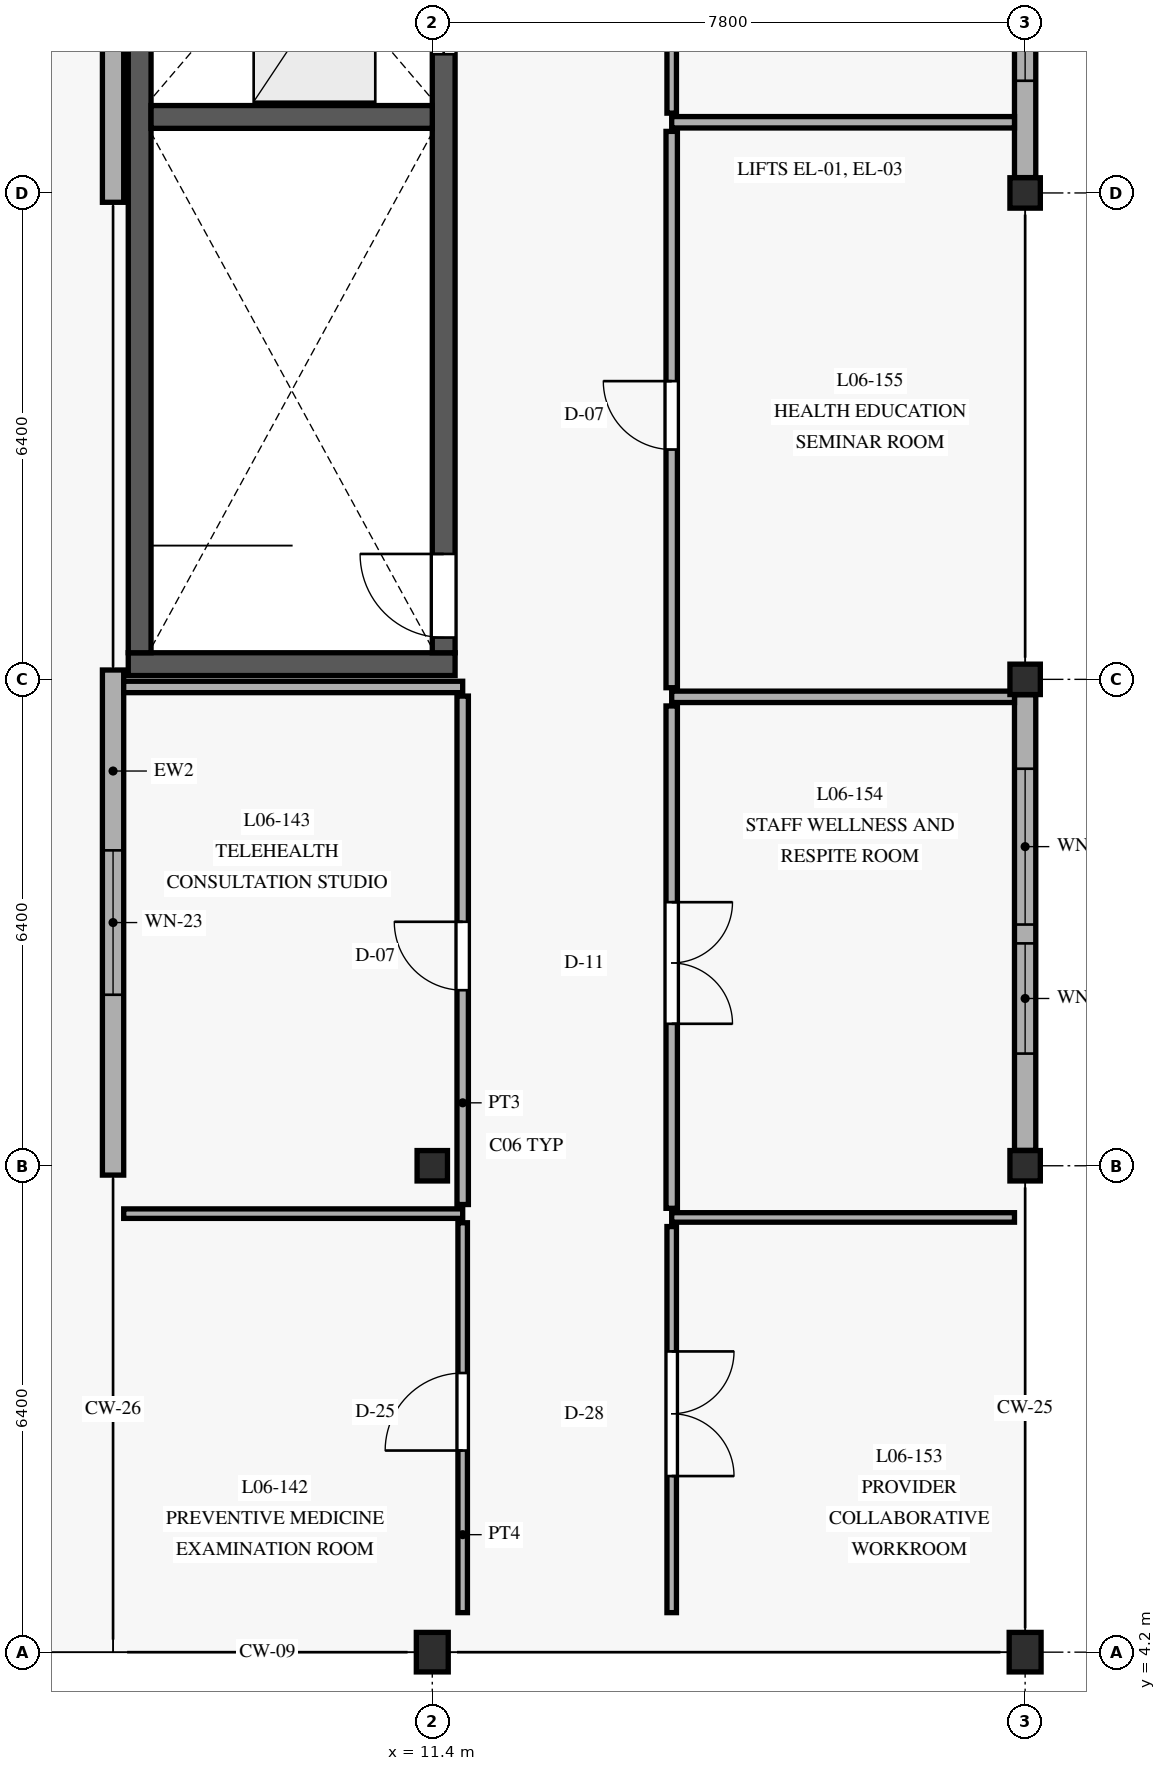
"""IFC4 building model, lengths in metres.
Left out: names, types, materials, properties, quantities, classifications, styles, units other than length and angle.
Written with IfcOpenShell. Run it as: python <this file> out.ifc"""

import sys

from ifc_helpers import new_model, si_unit, direction, frame, frame_2d, origin, origin_with_axes, origin_2d, place, context, subcontext, project, spatial, rectangle, extrude, element, fill, save


model = new_model("IFC4")
c1 = context("Model", 3, precision=1e-05, world=origin(), true_north=direction((0.0, 1.0)))
c2 = subcontext(c1, "Body", "Model", "MODEL_VIEW")
j1 = project(units=[si_unit("LENGTHUNIT", "METRE"), si_unit("PLANEANGLEUNIT", "RADIAN")], contexts=[c1])
p1 = place(None, origin())
s1 = spatial("IfcSite", under=j1, at=p1, CompositionType="ELEMENT")
p2 = place(p1, origin())
s2 = spatial("IfcBuilding", under=s1, at=p2, CompositionType="ELEMENT")
p3 = place(p2, frame((0.0, 0.0, 21.6)))
s3 = spatial("IfcBuildingStorey", under=s2, at=p3, CompositionType="ELEMENT", Elevation=21.6)
p4 = place(p3, frame((11.4, 4.2, 0.0), z_axis=(0.0, 0.0, 1.0), x_axis=(1.0, 0.0, 0.0)))
e1 = element("IfcColumn", 1, at=p4, inside=s3, PredefinedType="COLUMN", context=c2, shape_type="SweptSolid", body=[
    extrude(rectangle(XDim=0.42, YDim=0.52, at=origin_2d()), origin(), (0.0, 0.0, 1.0), 4.05),
])
p5 = place(p3, frame((11.4, 10.6, 0.0), z_axis=(0.0, 0.0, 1.0), x_axis=(1.0, 0.0, 0.0)))
e2 = element("IfcColumn", 2, at=p5, inside=s3, PredefinedType="COLUMN", context=c2, shape_type="SweptSolid", body=[
    extrude(rectangle(XDim=0.4, YDim=0.4, at=origin_2d()), origin(), (0.0, 0.0, 1.0), 4.05),
])
p6 = place(p3, frame((19.2, 4.2, 0.0), z_axis=(0.0, 0.0, 1.0), x_axis=(1.0, 0.0, 0.0)))
e3 = element("IfcColumn", 3, at=p6, inside=s3, PredefinedType="COLUMN", context=c2, shape_type="SweptSolid", body=[
    extrude(rectangle(XDim=0.42, YDim=0.52, at=origin_2d()), origin(), (0.0, 0.0, 1.0), 4.05),
])
for number, where, z_axis, x_axis in (
    (4, (19.2, 10.6, 0.0), (0.0, 0.0, 1.0), (1.0, 0.0, 0.0)),
    (5, (19.2, 17.0, 0.0), (0.0, 0.0, 1.0), (1.0, 0.0, 0.0)),
    (6, (19.2, 23.4, 0.0), (0.0, 0.0, 1.0), (1.0, 0.0, 0.0)),
):
    element("IfcColumn", number, at=place(p3, frame(where, z_axis=z_axis, x_axis=x_axis)), inside=s3, PredefinedType="COLUMN", context=c2, shape_type="SweptSolid", body=[
        extrude(rectangle(XDim=0.4, YDim=0.4, at=origin_2d()), origin(), (0.0, 0.0, 1.0), 4.05),
    ])
p7 = place(p3, frame((7.4, 17.2, 0.0), z_axis=(0.0, 0.0, 1.0), x_axis=(1.0, 0.0, 0.0)))
e7 = element("IfcWall", 7, at=p7, inside=s3, PredefinedType="SHEAR", context=c2, shape_type="SweptSolid", body=[
    extrude(rectangle(XDim=4.3, YDim=0.3, at=frame_2d((2.15, 0.0))), origin(), (0.0, 0.0, 1.0), 3.84),
])
p8 = place(p3, frame((7.55, 29.05, 0.0), z_axis=(0.0, 0.0, 1.0), x_axis=(0.0, -1.0, 0.0)))
e8 = element("IfcWall", 8, at=p8, inside=s3, PredefinedType="SHEAR", context=c2, shape_type="SweptSolid", body=[
    extrude(rectangle(XDim=11.7, YDim=0.3, at=frame_2d((5.85, 0.0))), origin(), (0.0, 0.0, 1.0), 3.84),
])
p9 = place(p3, frame((11.55, 17.35, 0.0), z_axis=(0.0, 0.0, 1.0), x_axis=(0.0, 1.0, 0.0)))
e9 = element("IfcWall", 9, at=p9, inside=s3, PredefinedType="SHEAR", context=c2, shape_type="SweptSolid", body=[
    extrude(rectangle(XDim=11.7, YDim=0.3, at=frame_2d((5.85, 0.0))), origin(), (0.0, 0.0, 1.0), 3.84),
])
p10 = place(p9, frame((0.2, 0.0, 0.0)))
e10 = element("IfcOpeningElement", 10, at=p10, cuts=e9, PredefinedType="OPENING", context=c2, shape_type="SweptSolid", body=[
    extrude(rectangle(XDim=1.1, YDim=2.2, at=frame_2d((0.55, 1.1))), frame((0.0, 0.16, 0.0), z_axis=(0.0, -1.0, 0.0), x_axis=(1.0, 0.0, 0.0)), (0.0, 0.0, 1.0), 0.32),
])
p11 = place(p9, frame((7.875, 0.0, 0.0)))
e11 = element("IfcOpeningElement", 11, at=p11, cuts=e9, PredefinedType="OPENING", context=c2, shape_type="SweptSolid", body=[
    extrude(rectangle(XDim=1.15, YDim=2.2, at=frame_2d((0.575, 1.1))), frame((0.0, 0.16, 0.0), z_axis=(0.0, -1.0, 0.0), x_axis=(1.0, 0.0, 0.0)), (0.0, 0.0, 1.0), 0.32),
])
p12 = place(p9, frame((10.14, 0.0, 0.0)))
e12 = element("IfcOpeningElement", 12, at=p12, cuts=e9, PredefinedType="OPENING", context=c2, shape_type="SweptSolid", body=[
    extrude(rectangle(XDim=1.02, YDim=2.15, at=frame_2d((0.51, 1.075))), frame((0.0, 0.16, 0.0), z_axis=(0.0, -1.0, 0.0), x_axis=(1.0, 0.0, 0.0)), (0.0, 0.0, 1.0), 0.32),
])
p13 = place(p3, frame((7.7, 24.4, 0.0), z_axis=(0.0, 0.0, 1.0), x_axis=(1.0, 0.0, 0.0)))
e13 = element("IfcWall", 13, at=p13, inside=s3, PredefinedType="SHEAR", context=c2, shape_type="SweptSolid", body=[
    extrude(rectangle(XDim=3.7, YDim=0.3, at=frame_2d((1.85, 0.0))), origin(), (0.0, 0.0, 1.0), 3.84),
])
p14 = place(p3, frame((7.2, 17.123, 0.0), z_axis=(0.0, 0.0, 1.0), x_axis=(0.0, -1.0, 0.0)))
e14 = element("IfcWall", 14, at=p14, inside=s3, PredefinedType="SOLIDWALL", context=c2, shape_type="SweptSolid", body=[
    extrude(rectangle(XDim=6.646, YDim=0.28, at=frame_2d((3.323, 0.0))), origin(), (0.0, 0.0, 1.0), 3.84),
])
p15 = place(p14, frame((2.373, 0.0, 0.85)))
e15 = element("IfcOpeningElement", 15, at=p15, cuts=e14, PredefinedType="OPENING", context=c2, shape_type="SweptSolid", body=[
    extrude(rectangle(XDim=1.9, YDim=1.75, at=frame_2d((0.95, 0.875))), frame((0.0, 0.15, 0.0), z_axis=(0.0, -1.0, 0.0), x_axis=(1.0, 0.0, 0.0)), (0.0, 0.0, 1.0), 0.3),
])
p16 = place(p3, frame((7.2, 29.923, 0.0), z_axis=(0.0, 0.0, 1.0), x_axis=(0.0, -1.0, 0.0)))
e16 = element("IfcWall", 16, at=p16, inside=s3, PredefinedType="SOLIDWALL", context=c2, shape_type="SweptSolid", body=[
    extrude(rectangle(XDim=6.646, YDim=0.28, at=frame_2d((3.323, 0.0))), origin(), (0.0, 0.0, 1.0), 3.84),
])
p17 = place(p16, frame((2.373, 0.0, 0.85)))
e17 = element("IfcOpeningElement", 17, at=p17, cuts=e16, PredefinedType="OPENING", context=c2, shape_type="SweptSolid", body=[
    extrude(rectangle(XDim=1.9, YDim=1.75, at=frame_2d((0.95, 0.875))), frame((0.0, 0.15, 0.0), z_axis=(0.0, -1.0, 0.0), x_axis=(1.0, 0.0, 0.0)), (0.0, 0.0, 1.0), 0.3),
])
p18 = place(p3, frame((19.2, 10.802, 0.0), z_axis=(0.0, 0.0, 1.0), x_axis=(0.0, 1.0, 0.0)))
e18 = element("IfcWall", 18, at=p18, inside=s3, PredefinedType="SOLIDWALL", context=c2, shape_type="SweptSolid", body=[
    extrude(rectangle(XDim=5.996, YDim=0.28, at=frame_2d((2.998, 0.0))), origin(), (0.0, 0.0, 1.0), 3.46),
])
p19 = place(p18, frame((1.274, 0.0, 0.85)))
e19 = element("IfcOpeningElement", 19, at=p19, cuts=e18, PredefinedType="OPENING", context=c2, shape_type="SweptSolid", body=[
    extrude(rectangle(XDim=1.45, YDim=1.95, at=frame_2d((0.725, 0.975))), frame((0.0, 0.15, 0.0), z_axis=(0.0, -1.0, 0.0), x_axis=(1.0, 0.0, 0.0)), (0.0, 0.0, 1.0), 0.3),
])
p20 = place(p18, frame((2.972, 0.0, 0.85)))
e20 = element("IfcOpeningElement", 20, at=p20, cuts=e18, PredefinedType="OPENING", context=c2, shape_type="SweptSolid", body=[
    extrude(rectangle(XDim=2.05, YDim=1.95, at=frame_2d((1.025, 0.975))), frame((0.0, 0.15, 0.0), z_axis=(0.0, -1.0, 0.0), x_axis=(1.0, 0.0, 0.0)), (0.0, 0.0, 1.0), 0.3),
])
p21 = place(p3, frame((19.2, 23.602, 0.0), z_axis=(0.0, 0.0, 1.0), x_axis=(0.0, 1.0, 0.0)))
e21 = element("IfcWall", 21, at=p21, inside=s3, PredefinedType="SOLIDWALL", context=c2, shape_type="SweptSolid", body=[
    extrude(rectangle(XDim=5.996, YDim=0.28, at=frame_2d((2.998, 0.0))), origin(), (0.0, 0.0, 1.0), 3.46),
])
p22 = place(p21, frame((1.274, 0.0, 0.85)))
e22 = element("IfcOpeningElement", 22, at=p22, cuts=e21, PredefinedType="OPENING", context=c2, shape_type="SweptSolid", body=[
    extrude(rectangle(XDim=1.45, YDim=1.95, at=frame_2d((0.725, 0.975))), frame((0.0, 0.15, 0.0), z_axis=(0.0, -1.0, 0.0), x_axis=(1.0, 0.0, 0.0)), (0.0, 0.0, 1.0), 0.3),
])
p23 = place(p21, frame((2.972, 0.0, 0.85)))
e23 = element("IfcOpeningElement", 23, at=p23, cuts=e21, PredefinedType="OPENING", context=c2, shape_type="SweptSolid", body=[
    extrude(rectangle(XDim=2.05, YDim=1.95, at=frame_2d((1.025, 0.975))), frame((0.0, 0.15, 0.0), z_axis=(0.0, -1.0, 0.0), x_axis=(1.0, 0.0, 0.0)), (0.0, 0.0, 1.0), 0.3),
])
p24 = place(p3, frame((11.8, 4.72, 0.0), z_axis=(0.0, 0.0, 1.0), x_axis=(0.0, 1.0, 0.0)))
e24 = element("IfcWall", 24, at=p24, inside=s3, PredefinedType="PARTITIONING", context=c2, shape_type="SweptSolid", body=[
    extrude(rectangle(XDim=5.13, YDim=0.125, at=frame_2d((2.565, 0.0))), origin(), (0.0, 0.0, 1.0), 3.835),
])
p25 = place(p24, frame((2.133, 0.0, 0.0)))
e25 = element("IfcOpeningElement", 25, at=p25, cuts=e24, PredefinedType="OPENING", context=c2, shape_type="SweptSolid", body=[
    extrude(rectangle(XDim=1.02, YDim=2.18, at=frame_2d((0.51, 1.09))), frame((0.0, 0.073, 0.0), z_axis=(0.0, -1.0, 0.0), x_axis=(1.0, 0.0, 0.0)), (0.0, 0.0, 1.0), 0.145),
])
p26 = place(p3, frame((7.34, 9.97, 0.0), z_axis=(0.0, 0.0, 1.0), x_axis=(1.0, 0.0, 0.0)))
e26 = element("IfcWall", 26, at=p26, inside=s3, PredefinedType="PARTITIONING", context=c2, shape_type="SweptSolid", body=[
    extrude(rectangle(XDim=4.46, YDim=0.125, at=frame_2d((2.23, 0.0))), origin(), (0.0, 0.0, 1.0), 3.455),
])
p27 = place(p3, frame((11.8, 10.09, 0.0), z_axis=(0.0, 0.0, 1.0), x_axis=(0.0, 1.0, 0.0)))
e27 = element("IfcWall", 27, at=p27, inside=s3, PredefinedType="PARTITIONING", context=c2, shape_type="SweptSolid", body=[
    extrude(rectangle(XDim=6.69, YDim=0.15, at=frame_2d((3.345, 0.0))), origin(), (0.0, 0.0, 1.0), 3.435),
])
p28 = place(p27, frame((2.82, 0.0, 0.0)))
e28 = element("IfcOpeningElement", 28, at=p28, cuts=e27, PredefinedType="OPENING", context=c2, shape_type="SweptSolid", body=[
    extrude(rectangle(XDim=0.9, YDim=2.12, at=frame_2d((0.45, 1.06))), frame((0.0, 0.085, 0.0), z_axis=(0.0, -1.0, 0.0), x_axis=(1.0, 0.0, 0.0)), (0.0, 0.0, 1.0), 0.17),
])
p29 = place(p3, frame((7.34, 16.9, 0.0), z_axis=(0.0, 0.0, 1.0), x_axis=(1.0, 0.0, 0.0)))
e29 = element("IfcWall", 29, at=p29, inside=s3, PredefinedType="PARTITIONING", context=c2, shape_type="SweptSolid", body=[
    extrude(rectangle(XDim=4.46, YDim=0.15, at=frame_2d((2.23, 0.0))), origin(), (0.0, 0.0, 1.0), 3.435),
])
p30 = place(p3, frame((14.55, 4.72, 0.0), z_axis=(0.0, 0.0, 1.0), x_axis=(0.0, 1.0, 0.0)))
e30 = element("IfcWall", 30, at=p30, inside=s3, PredefinedType="PARTITIONING", context=c2, shape_type="SweptSolid", body=[
    extrude(rectangle(XDim=5.08, YDim=0.125, at=frame_2d((2.54, 0.0))), origin(), (0.0, 0.0, 1.0), 3.835),
])
p31 = place(p30, frame((1.797, 0.0, 0.0)))
e31 = element("IfcOpeningElement", 31, at=p31, cuts=e30, PredefinedType="OPENING", context=c2, shape_type="SweptSolid", body=[
    extrude(rectangle(XDim=1.64, YDim=2.32, at=frame_2d((0.82, 1.16))), frame((0.0, 0.073, 0.0), z_axis=(0.0, -1.0, 0.0), x_axis=(1.0, 0.0, 0.0)), (0.0, 0.0, 1.0), 0.145),
])
p32 = place(p3, frame((14.55, 9.92, 0.0), z_axis=(0.0, 0.0, 1.0), x_axis=(1.0, 0.0, 0.0)))
e32 = element("IfcWall", 32, at=p32, inside=s3, PredefinedType="PARTITIONING", context=c2, shape_type="SweptSolid", body=[
    extrude(rectangle(XDim=4.51, YDim=0.125, at=frame_2d((2.255, 0.0))), origin(), (0.0, 0.0, 1.0), 3.455),
])
p33 = place(p3, frame((14.55, 10.04, 0.0), z_axis=(0.0, 0.0, 1.0), x_axis=(0.0, 1.0, 0.0)))
e33 = element("IfcWall", 33, at=p33, inside=s3, PredefinedType="PARTITIONING", context=c2, shape_type="SweptSolid", body=[
    extrude(rectangle(XDim=6.61, YDim=0.15, at=frame_2d((3.305, 0.0))), origin(), (0.0, 0.0, 1.0), 3.435),
])
p34 = place(p33, frame((2.428, 0.0, 0.0)))
e34 = element("IfcOpeningElement", 34, at=p34, cuts=e33, PredefinedType="OPENING", context=c2, shape_type="SweptSolid", body=[
    extrude(rectangle(XDim=1.6, YDim=2.25, at=frame_2d((0.8, 1.125))), frame((0.0, 0.085, 0.0), z_axis=(0.0, -1.0, 0.0), x_axis=(1.0, 0.0, 0.0)), (0.0, 0.0, 1.0), 0.17),
])
p35 = place(p3, frame((14.55, 16.77, 0.0), z_axis=(0.0, 0.0, 1.0), x_axis=(1.0, 0.0, 0.0)))
e35 = element("IfcWall", 35, at=p35, inside=s3, PredefinedType="PARTITIONING", context=c2, shape_type="SweptSolid", body=[
    extrude(rectangle(XDim=4.51, YDim=0.15, at=frame_2d((2.255, 0.0))), origin(), (0.0, 0.0, 1.0), 3.435),
])
p36 = place(p3, frame((14.55, 16.89, 0.0), z_axis=(0.0, 0.0, 1.0), x_axis=(0.0, 1.0, 0.0)))
e36 = element("IfcWall", 36, at=p36, inside=s3, PredefinedType="PARTITIONING", context=c2, shape_type="SweptSolid", body=[
    extrude(rectangle(XDim=7.32, YDim=0.15, at=frame_2d((3.66, 0.0))), origin(), (0.0, 0.0, 1.0), 3.435),
])
p37 = place(p36, frame((3.134, 0.0, 0.0)))
e37 = element("IfcOpeningElement", 37, at=p37, cuts=e36, PredefinedType="OPENING", context=c2, shape_type="SweptSolid", body=[
    extrude(rectangle(XDim=0.9, YDim=2.12, at=frame_2d((0.45, 1.06))), frame((0.0, 0.085, 0.0), z_axis=(0.0, -1.0, 0.0), x_axis=(1.0, 0.0, 0.0)), (0.0, 0.0, 1.0), 0.17),
])
p38 = place(p3, frame((14.55, 24.33, 0.0), z_axis=(0.0, 0.0, 1.0), x_axis=(1.0, 0.0, 0.0)))
e38 = element("IfcWall", 38, at=p38, inside=s3, PredefinedType="PARTITIONING", context=c2, shape_type="SweptSolid", body=[
    extrude(rectangle(XDim=4.51, YDim=0.15, at=frame_2d((2.255, 0.0))), origin(), (0.0, 0.0, 1.0), 3.455),
])
p39 = place(p3, frame((14.55, 24.45, 0.0), z_axis=(0.0, 0.0, 1.0), x_axis=(0.0, 1.0, 0.0)))
e39 = element("IfcWall", 39, at=p39, inside=s3, PredefinedType="PARTITIONING", context=c2, shape_type="SweptSolid", body=[
    extrude(rectangle(XDim=5.78, YDim=0.125, at=frame_2d((2.89, 0.0))), origin(), (0.0, 0.0, 1.0), 3.435),
])
p40 = place(p39, frame((2.07, 0.0, 0.0)))
e40 = element("IfcOpeningElement", 40, at=p40, cuts=e39, PredefinedType="OPENING", context=c2, shape_type="SweptSolid", body=[
    extrude(rectangle(XDim=1.64, YDim=2.32, at=frame_2d((0.82, 1.16))), frame((0.0, 0.073, 0.0), z_axis=(0.0, -1.0, 0.0), x_axis=(1.0, 0.0, 0.0)), (0.0, 0.0, 1.0), 0.145),
])
p41 = place(p10, origin_with_axes())
e41 = element("IfcDoor", 41, at=p41, inside=s3, OperationType="SINGLE_SWING_RIGHT", PredefinedType="DOOR", context=c2, shape_type="SweptSolid", body=[
    extrude(rectangle(XDim=1.1, YDim=2.2, at=frame_2d((0.55, 1.1))), frame((0.0, 0.025, 0.0), z_axis=(0.0, -1.0, 0.0), x_axis=(1.0, 0.0, 0.0)), (0.0, 0.0, 1.0), 0.05),
])
fill(e10, e41)
p42 = place(p11, origin_with_axes())
e42 = element("IfcDoor", 42, at=p42, inside=s3, OperationType="SLIDING_TO_LEFT", PredefinedType="DOOR", context=c2, shape_type="SweptSolid", body=[
    extrude(rectangle(XDim=1.15, YDim=2.2, at=frame_2d((0.575, 1.1))), frame((0.0, 0.025, 0.0), z_axis=(0.0, -1.0, 0.0), x_axis=(1.0, 0.0, 0.0)), (0.0, 0.0, 1.0), 0.05),
])
fill(e11, e42)
p43 = place(p15, origin_with_axes())
e43 = element("IfcWindow", 43, at=p43, inside=s3, PartitioningType="SINGLE_PANEL", PredefinedType="WINDOW", context=c2, shape_type="SweptSolid", body=[
    extrude(rectangle(XDim=1.9, YDim=1.75, at=frame_2d((0.95, 0.875))), frame((0.0, 0.03, 0.0), z_axis=(0.0, -1.0, 0.0), x_axis=(1.0, 0.0, 0.0)), (0.0, 0.0, 1.0), 0.06),
])
fill(e15, e43)
p44 = place(p19, origin_with_axes())
e44 = element("IfcWindow", 44, at=p44, inside=s3, PartitioningType="SINGLE_PANEL", PredefinedType="WINDOW", context=c2, shape_type="SweptSolid", body=[
    extrude(rectangle(XDim=1.45, YDim=1.95, at=frame_2d((0.725, 0.975))), frame((0.0, 0.03, 0.0), z_axis=(0.0, -1.0, 0.0), x_axis=(1.0, 0.0, 0.0)), (0.0, 0.0, 1.0), 0.06),
])
fill(e19, e44)
p45 = place(p20, origin_with_axes())
e45 = element("IfcWindow", 45, at=p45, inside=s3, PartitioningType="SINGLE_PANEL", PredefinedType="WINDOW", context=c2, shape_type="SweptSolid", body=[
    extrude(rectangle(XDim=2.05, YDim=1.95, at=frame_2d((1.025, 0.975))), frame((0.0, 0.03, 0.0), z_axis=(0.0, -1.0, 0.0), x_axis=(1.0, 0.0, 0.0)), (0.0, 0.0, 1.0), 0.06),
])
fill(e20, e45)
p46 = place(p22, origin_with_axes())
e46 = element("IfcWindow", 46, at=p46, inside=s3, PartitioningType="SINGLE_PANEL", PredefinedType="WINDOW", context=c2, shape_type="SweptSolid", body=[
    extrude(rectangle(XDim=1.45, YDim=1.95, at=frame_2d((0.725, 0.975))), frame((0.0, 0.03, 0.0), z_axis=(0.0, -1.0, 0.0), x_axis=(1.0, 0.0, 0.0)), (0.0, 0.0, 1.0), 0.06),
])
fill(e22, e46)
p47 = place(p25, origin_with_axes())
e47 = element("IfcDoor", 47, at=p47, inside=s3, OperationType="SINGLE_SWING_LEFT", PredefinedType="DOOR", context=c2, shape_type="SweptSolid", body=[
    extrude(rectangle(XDim=1.02, YDim=2.18, at=frame_2d((0.51, 1.09))), frame((0.0, 0.025, 0.0), z_axis=(0.0, -1.0, 0.0), x_axis=(1.0, 0.0, 0.0)), (0.0, 0.0, 1.0), 0.05),
])
fill(e25, e47)
p48 = place(p28, origin_with_axes())
e48 = element("IfcDoor", 48, at=p48, inside=s3, OperationType="SINGLE_SWING_RIGHT", PredefinedType="DOOR", context=c2, shape_type="SweptSolid", body=[
    extrude(rectangle(XDim=0.9, YDim=2.12, at=frame_2d((0.45, 1.06))), frame((0.0, 0.025, 0.0), z_axis=(0.0, -1.0, 0.0), x_axis=(1.0, 0.0, 0.0)), (0.0, 0.0, 1.0), 0.05),
])
fill(e28, e48)
p49 = place(p31, frame((1.64, 0.0, 0.0), z_axis=(0.0, 0.0, 1.0), x_axis=(-1.0, 0.0, 0.0)))
e49 = element("IfcDoor", 49, at=p49, inside=s3, OperationType="DOUBLE_DOOR_SINGLE_SWING", PredefinedType="DOOR", context=c2, shape_type="SweptSolid", body=[
    extrude(rectangle(XDim=1.64, YDim=2.32, at=frame_2d((0.82, 1.16))), frame((0.0, 0.025, 0.0), z_axis=(0.0, -1.0, 0.0), x_axis=(1.0, 0.0, 0.0)), (0.0, 0.0, 1.0), 0.05),
])
fill(e31, e49)
p50 = place(p34, frame((1.6, 0.0, 0.0), z_axis=(0.0, 0.0, 1.0), x_axis=(-1.0, 0.0, 0.0)))
e50 = element("IfcDoor", 50, at=p50, inside=s3, OperationType="DOUBLE_DOOR_SINGLE_SWING", PredefinedType="DOOR", context=c2, shape_type="SweptSolid", body=[
    extrude(rectangle(XDim=1.6, YDim=2.25, at=frame_2d((0.8, 1.125))), frame((0.0, 0.025, 0.0), z_axis=(0.0, -1.0, 0.0), x_axis=(1.0, 0.0, 0.0)), (0.0, 0.0, 1.0), 0.05),
])
fill(e34, e50)
p51 = place(p37, frame((0.9, 0.0, 0.0), z_axis=(0.0, 0.0, 1.0), x_axis=(-1.0, 0.0, 0.0)))
e51 = element("IfcDoor", 51, at=p51, inside=s3, OperationType="SINGLE_SWING_LEFT", PredefinedType="DOOR", context=c2, shape_type="SweptSolid", body=[
    extrude(rectangle(XDim=0.9, YDim=2.12, at=frame_2d((0.45, 1.06))), frame((0.0, 0.025, 0.0), z_axis=(0.0, -1.0, 0.0), x_axis=(1.0, 0.0, 0.0)), (0.0, 0.0, 1.0), 0.05),
])
fill(e37, e51)
save(model, sys.argv[1])
